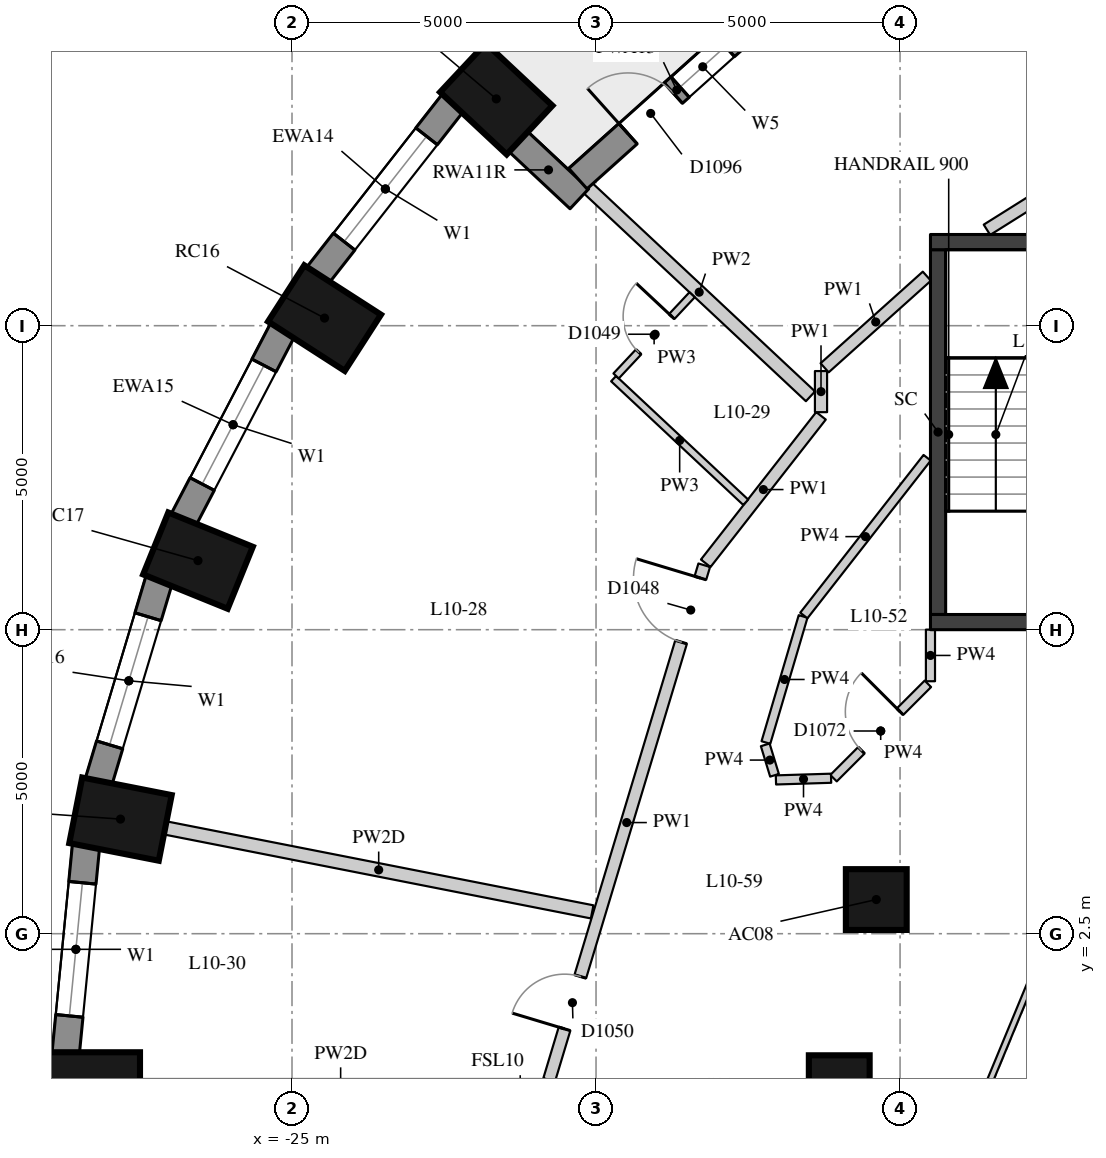
"""IFC4 building model, lengths in metres.
Left out: names, types, materials, properties, quantities, classifications, styles, units other than length and angle.
Written with IfcOpenShell. Run it as: python <this file> out.ifc"""

import sys

from ifc_helpers import new_model, si_unit, direction, frame, frame_2d, origin, origin_2d, place, context, subcontext, project, spatial, rectangle, extrude, element, fill, save


model = new_model("IFC4")
c1 = context("Model", 3, precision=1e-05, world=origin(), true_north=direction((0.0, 1.0)))
c2 = subcontext(c1, "Body", "Model", "MODEL_VIEW")
j1 = project(units=[si_unit("LENGTHUNIT", "METRE"), si_unit("PLANEANGLEUNIT", "RADIAN")], contexts=[c1])
p1 = place(None, origin())
s1 = spatial("IfcSite", under=j1, at=p1, CompositionType="ELEMENT")
p2 = place(p1, origin())
s2 = spatial("IfcBuilding", under=s1, at=p2, CompositionType="ELEMENT")
p3 = place(p2, frame((0.0, 0.0, 41.5)))
s3 = spatial("IfcBuildingStorey", under=s2, at=p3, CompositionType="ELEMENT", Elevation=41.5)
for number, where, z_axis, x_axis in (
    (1, (-21.641, 16.23, 0.0), (0.0, 0.0, 1.0), (-0.73, 0.683, 0.0)),
    (2, (-24.465, 12.625, 0.0), (0.0, 0.0, 1.0), (-0.841, 0.541, 0.0)),
    (3, (-26.546, 8.636, 0.0), (0.0, 0.0, 1.0), (-0.927, 0.376, 0.0)),
    (4, (-27.821, 4.385, 0.0), (0.0, 0.0, 1.0), (-0.981, 0.193, 0.0)),
    (5, (-28.25, 0.0, 0.0), (0.0, 0.0, 1.0), (-1.0, 0.0, 0.0)),
):
    element("IfcColumn", number, at=place(p3, frame(where, z_axis=z_axis, x_axis=x_axis)), inside=s3, PredefinedType="COLUMN", context=c2, shape_type="SweptSolid", body=[
        extrude(rectangle(XDim=1.5, YDim=1.1, at=origin_2d()), origin(), (0.0, 0.0, 1.0), 3.3),
    ])
for number, where, z_axis, x_axis in (
    (6, (-15.391, 3.062, 0.0), (0.0, 0.0, 1.0), (1.0, 0.0, 0.0)),
    (7, (-16.0, 0.0, 0.0), (0.0, 0.0, 1.0), (1.0, 0.0, 0.0)),
):
    element("IfcColumn", number, at=place(p3, frame(where, z_axis=z_axis, x_axis=x_axis)), inside=s3, PredefinedType="COLUMN", context=c2, shape_type="SweptSolid", body=[
        extrude(rectangle(XDim=1.0, YDim=1.0, at=origin_2d()), origin(), (0.0, 0.0, 1.0), 3.3),
    ])
p4 = place(p3, frame((-22.352, 16.17, 0.0), z_axis=(0.0, 0.0, 1.0), x_axis=(-0.616661975264, -0.787228053529, 0.0)))
e8 = element("IfcWall", 8, at=p4, inside=s3, PredefinedType="SOLIDWALL", context=c2, shape_type="SweptSolid", body=[
    extrude(rectangle(XDim=3.61, YDim=0.45, at=frame_2d((1.805, 0.0))), origin(), (0.0, 0.0, 1.0), 3.02),
])
p5 = place(p4, frame((0.705, 0.0, 0.4)))
e9 = element("IfcOpeningElement", 9, at=p5, cuts=e8, PredefinedType="OPENING", context=c2, shape_type="SweptSolid", body=[
    extrude(rectangle(XDim=2.2, YDim=1.75, at=frame_2d((1.1, 0.875))), frame((0.0, 0.235, 0.0), z_axis=(0.0, -1.0, 0.0), x_axis=(1.0, 0.0, 0.0)), (0.0, 0.0, 1.0), 0.47),
])
p6 = place(p3, frame((-25.152, 12.437, 0.0), z_axis=(0.0, 0.0, 1.0), x_axis=(-0.462492775226, -0.886623050041, 0.0)))
e10 = element("IfcWall", 10, at=p6, inside=s3, PredefinedType="SOLIDWALL", context=c2, shape_type="SweptSolid", body=[
    extrude(rectangle(XDim=3.532, YDim=0.45, at=frame_2d((1.766, 0.0))), origin(), (0.0, 0.0, 1.0), 3.02),
])
p7 = place(p6, frame((0.666, 0.0, 0.4)))
e11 = element("IfcOpeningElement", 11, at=p7, cuts=e10, PredefinedType="OPENING", context=c2, shape_type="SweptSolid", body=[
    extrude(rectangle(XDim=2.2, YDim=1.75, at=frame_2d((1.1, 0.875))), frame((0.0, 0.235, 0.0), z_axis=(0.0, -1.0, 0.0), x_axis=(1.0, 0.0, 0.0)), (0.0, 0.0, 1.0), 0.47),
])
p8 = place(p3, frame((-27.185, 8.323, 0.0), z_axis=(0.0, 0.0, 1.0), x_axis=(-0.287064133733, -0.957911364963, 0.0)))
e12 = element("IfcWall", 12, at=p8, inside=s3, PredefinedType="SOLIDWALL", context=c2, shape_type="SweptSolid", body=[
    extrude(rectangle(XDim=3.473, YDim=0.45, at=frame_2d((1.737, 0.0))), origin(), (0.0, 0.0, 1.0), 3.02),
])
p9 = place(p8, frame((0.637, 0.0, 0.4)))
e13 = element("IfcOpeningElement", 13, at=p9, cuts=e12, PredefinedType="OPENING", context=c2, shape_type="SweptSolid", body=[
    extrude(rectangle(XDim=2.2, YDim=1.75, at=frame_2d((1.1, 0.875))), frame((0.0, 0.235, 0.0), z_axis=(0.0, -1.0, 0.0), x_axis=(1.0, 0.0, 0.0)), (0.0, 0.0, 1.0), 0.47),
])
p10 = place(p3, frame((-28.387, 3.956, 0.0), z_axis=(0.0, 0.0, 1.0), x_axis=(-0.097389581596, -0.995246336038, 0.0)))
e14 = element("IfcWall", 14, at=p10, inside=s3, PredefinedType="SOLIDWALL", context=c2, shape_type="SweptSolid", body=[
    extrude(rectangle(XDim=3.442, YDim=0.45, at=frame_2d((1.721, 0.0))), origin(), (0.0, 0.0, 1.0), 3.02),
])
p11 = place(p10, frame((0.621, 0.0, 0.4)))
e15 = element("IfcOpeningElement", 15, at=p11, cuts=e14, PredefinedType="OPENING", context=c2, shape_type="SweptSolid", body=[
    extrude(rectangle(XDim=2.2, YDim=1.75, at=frame_2d((1.1, 0.875))), frame((0.0, 0.235, 0.0), z_axis=(0.0, -1.0, 0.0), x_axis=(1.0, 0.0, 0.0)), (0.0, 0.0, 1.0), 0.47),
])
p12 = place(p3, frame((-21.289, 15.538, 0.0), z_axis=(0.0, 0.0, 1.0), x_axis=(0.730149942784, -0.683286953668, 0.0)))
e16 = element("IfcWall", 16, at=p12, inside=s3, PredefinedType="SOLIDWALL", context=c2, shape_type="SweptSolid", body=[
    extrude(rectangle(XDim=1.391, YDim=0.45, at=frame_2d((0.695, 0.0))), origin(), (0.0, 0.0, 1.0), 3.02),
])
p13 = place(p3, frame((-17.048, 17.832, 0.0), z_axis=(0.0, 0.0, 1.0), x_axis=(-0.744619286768, -0.667489413978, 0.0)))
e17 = element("IfcWall", 17, at=p13, inside=s3, PredefinedType="SOLIDWALL", context=c2, shape_type="SweptSolid", body=[
    extrude(rectangle(XDim=4.365, YDim=0.45, at=frame_2d((2.183, 0.0))), origin(), (0.0, 0.0, 1.0), 3.02),
])
p14 = place(p13, frame((1.107, 0.0, 0.4)))
e18 = element("IfcOpeningElement", 18, at=p14, cuts=e17, PredefinedType="OPENING", context=c2, shape_type="SweptSolid", body=[
    extrude(rectangle(XDim=1.0, YDim=1.75, at=frame_2d((0.5, 0.875))), frame((0.0, 0.235, 0.0), z_axis=(0.0, -1.0, 0.0), x_axis=(1.0, 0.0, 0.0)), (0.0, 0.0, 1.0), 0.47),
])
p15 = place(p13, frame((2.258, 0.0, 0.0)))
e19 = element("IfcOpeningElement", 19, at=p15, cuts=e17, PredefinedType="OPENING", context=c2, shape_type="SweptSolid", body=[
    extrude(rectangle(XDim=1.0, YDim=2.15, at=frame_2d((0.5, 1.075))), frame((0.0, 0.235, 0.0), z_axis=(0.0, -1.0, 0.0), x_axis=(1.0, 0.0, 0.0)), (0.0, 0.0, 1.0), 0.47),
])
p16 = place(p3, frame((-14.375, 7.75, -0.28), z_axis=(0.0, 0.0, 1.0), x_axis=(0.0, 1.0, 0.0)))
e20 = element("IfcWall", 20, at=p16, inside=s3, PredefinedType="SHEAR", context=c2, shape_type="SweptSolid", body=[
    extrude(rectangle(XDim=6.0, YDim=0.25, at=frame_2d((3.0, 0.0))), origin(), (0.0, 0.0, 1.0), 3.3),
])
for number, where, z_axis, x_axis in (
    (21, (-14.5, 13.875, -0.28), (0.0, 0.0, 1.0), (1.0, 0.0, 0.0)),
    (22, (-14.5, 7.625, -0.28), (0.0, 0.0, 1.0), (1.0, 0.0, 0.0)),
):
    element("IfcWall", number, at=place(p3, frame(where, z_axis=z_axis, x_axis=x_axis)), inside=s3, PredefinedType="SHEAR", context=c2, shape_type="SweptSolid", body=[
        extrude(rectangle(XDim=5.2, YDim=0.25, at=frame_2d((2.6, 0.0))), origin(), (0.0, 0.0, 1.0), 3.3),
    ])
p17 = place(p3, frame((-20.771, 0.095, 0.0), z_axis=(0.0, 0.0, 1.0), x_axis=(0.288464952331, 0.957490454927, 0.0)))
e23 = element("IfcWall", 23, at=p17, inside=s3, PredefinedType="PARTITIONING", context=c2, shape_type="SweptSolid", body=[
    extrude(rectangle(XDim=8.841, YDim=0.2, at=frame_2d((4.42, 0.0))), origin(), (0.0, 0.0, 1.0), 3.02),
])
p18 = place(p17, frame((7.521, 0.0, 0.0)))
e24 = element("IfcOpeningElement", 24, at=p18, cuts=e23, PredefinedType="OPENING", context=c2, shape_type="SweptSolid", body=[
    extrude(rectangle(XDim=1.1, YDim=2.1, at=frame_2d((0.55, 1.05))), frame((0.0, 0.11, 0.0), z_axis=(0.0, -1.0, 0.0), x_axis=(1.0, 0.0, 0.0)), (0.0, 0.0, 1.0), 0.22),
])
p19 = place(p17, frame((0.877, 0.0, 0.0)))
e25 = element("IfcOpeningElement", 25, at=p19, cuts=e23, PredefinedType="OPENING", context=c2, shape_type="SweptSolid", body=[
    extrude(rectangle(XDim=0.9, YDim=2.1, at=frame_2d((0.45, 1.05))), frame((0.0, 0.11, 0.0), z_axis=(0.0, -1.0, 0.0), x_axis=(1.0, 0.0, 0.0)), (0.0, 0.0, 1.0), 0.22),
])
p20 = place(p3, frame((-18.196, 8.592, 0.0), z_axis=(0.0, 0.0, 1.0), x_axis=(0.615854849191, 0.787859635168, 0.0)))
e26 = element("IfcWall", 26, at=p20, inside=s3, PredefinedType="PARTITIONING", context=c2, shape_type="SweptSolid", body=[
    extrude(rectangle(XDim=3.079, YDim=0.2, at=frame_2d((1.539, 0.0))), origin(), (0.0, 0.0, 1.0), 3.02),
])
p21 = place(p3, frame((-16.3, 11.078, 0.0), z_axis=(0.0, 0.0, 1.0), x_axis=(0.0, 1.0, 0.0)))
e27 = element("IfcWall", 27, at=p21, inside=s3, PredefinedType="PARTITIONING", context=c2, shape_type="SweptSolid", body=[
    extrude(rectangle(XDim=0.676, YDim=0.2, at=frame_2d((0.338, 0.0))), origin(), (0.0, 0.0, 1.0), 3.02),
])
p22 = place(p3, frame((-16.24, 11.807, 0.0), z_axis=(0.0, 0.0, 1.0), x_axis=(0.744658399013, 0.667445779655, 0.0)))
e28 = element("IfcWall", 28, at=p22, inside=s3, PredefinedType="PARTITIONING", context=c2, shape_type="SweptSolid", body=[
    extrude(rectangle(XDim=2.258, YDim=0.2, at=frame_2d((1.129, 0.0))), origin(), (0.0, 0.0, 1.0), 3.02),
])
p23 = place(p3, frame((-13.571, 14.077, 0.0), z_axis=(0.0, 0.0, 1.0), x_axis=(0.846954991261, 0.53166459613, 0.0)))
e29 = element("IfcWall", 29, at=p23, inside=s3, PredefinedType="PARTITIONING", context=c2, shape_type="SweptSolid", body=[
    extrude(rectangle(XDim=3.068, YDim=0.2, at=frame_2d((1.534, 0.0))), origin(), (0.0, 0.0, 1.0), 3.02),
])
p24 = place(p3, frame((-14.5, 7.501, 0.0), z_axis=(0.0, 0.0, 1.0), x_axis=(0.0, -1.0, 0.0)))
e30 = element("IfcWall", 30, at=p24, inside=s3, PredefinedType="PARTITIONING", context=c2, shape_type="SweptSolid", body=[
    extrude(rectangle(XDim=0.849, YDim=0.15, at=frame_2d((0.424, 0.0))), origin(), (0.0, 0.0, 1.0), 3.02),
])
p25 = place(p3, frame((-14.542, 6.61, 0.0), z_axis=(0.0, 0.0, 1.0), x_axis=(-0.707106781187, -0.707106781187, 0.0)))
e31 = element("IfcWall", 31, at=p25, inside=s3, PredefinedType="PARTITIONING", context=c2, shape_type="SweptSolid", body=[
    extrude(rectangle(XDim=2.195, YDim=0.15, at=frame_2d((1.097, 0.0))), origin(), (0.0, 0.0, 1.0), 3.02),
])
p26 = place(p25, frame((0.647, 0.0, 0.0)))
e32 = element("IfcOpeningElement", 32, at=p26, cuts=e31, PredefinedType="OPENING", context=c2, shape_type="SweptSolid", body=[
    extrude(rectangle(XDim=0.9, YDim=2.1, at=frame_2d((0.45, 1.05))), frame((0.0, 0.085, 0.0), z_axis=(0.0, -1.0, 0.0), x_axis=(1.0, 0.0, 0.0)), (0.0, 0.0, 1.0), 0.17),
])
p27 = place(p3, frame((-16.134, 5.057, 0.0), z_axis=(0.0, 0.0, 1.0), x_axis=(-0.999529504487, -0.030671968644, 0.0)))
e33 = element("IfcWall", 33, at=p27, inside=s3, PredefinedType="PARTITIONING", context=c2, shape_type="SweptSolid", body=[
    extrude(rectangle(XDim=0.907, YDim=0.15, at=frame_2d((0.454, 0.0))), origin(), (0.0, 0.0, 1.0), 3.02),
])
p28 = place(p3, frame((-17.065, 5.105, 0.0), z_axis=(0.0, 0.0, 1.0), x_axis=(-0.291495658108, 0.956572151646, 0.0)))
e34 = element("IfcWall", 34, at=p28, inside=s3, PredefinedType="PARTITIONING", context=c2, shape_type="SweptSolid", body=[
    extrude(rectangle(XDim=0.523, YDim=0.15, at=frame_2d((0.262, 0.0))), origin(), (0.0, 0.0, 1.0), 3.02),
])
p29 = place(p3, frame((-17.206, 5.645, 0.0), z_axis=(0.0, 0.0, 1.0), x_axis=(0.282930600638, 0.95914038348, 0.0)))
e35 = element("IfcWall", 35, at=p29, inside=s3, PredefinedType="PARTITIONING", context=c2, shape_type="SweptSolid", body=[
    extrude(rectangle(XDim=2.162, YDim=0.15, at=frame_2d((1.081, 0.0))), origin(), (0.0, 0.0, 1.0), 3.02),
])
p30 = place(p3, frame((-16.582, 7.734, 0.0), z_axis=(0.0, 0.0, 1.0), x_axis=(0.615848335932, 0.787864726416, 0.0)))
e36 = element("IfcWall", 36, at=p30, inside=s3, PredefinedType="PARTITIONING", context=c2, shape_type="SweptSolid", body=[
    extrude(rectangle(XDim=3.293, YDim=0.15, at=frame_2d((1.646, 0.0))), origin(), (0.0, 0.0, 1.0), 3.02),
])
p31 = place(p3, frame((-20.133, 14.764, 0.0), z_axis=(0.0, 0.0, 1.0), x_axis=(0.73007309337, -0.683369064516, 0.0)))
e37 = element("IfcWall", 37, at=p31, inside=s3, PredefinedType="PARTITIONING", context=c2, shape_type="SweptSolid", body=[
    extrude(rectangle(XDim=5.013, YDim=0.22, at=frame_2d((2.507, 0.0))), origin(), (0.0, 0.0, 1.0), 3.02),
])
p32 = place(p3, frame((-27.085, 4.24, 0.0), z_axis=(0.0, 0.0, 1.0), x_axis=(0.981197740145, -0.193005167635, 0.0)))
e38 = element("IfcWall", 38, at=p32, inside=s3, PredefinedType="PARTITIONING", context=c2, shape_type="SweptSolid", body=[
    extrude(rectangle(XDim=7.156, YDim=0.22, at=frame_2d((3.578, 0.0))), origin(), (0.0, 0.0, 1.0), 2.47),
])
p33 = place(p3, frame((-17.538, 9.596, 0.0), z_axis=(0.0, 0.0, 1.0), x_axis=(-0.730099766179, 0.683340567671, 0.0)))
e39 = element("IfcWall", 39, at=p33, inside=s3, PredefinedType="PARTITIONING", context=c2, shape_type="SweptSolid", body=[
    extrude(rectangle(XDim=2.976, YDim=0.12, at=frame_2d((1.488, 0.0))), origin(), (0.0, 0.0, 1.0), 3.02),
])
p34 = place(p3, frame((-19.67, 11.673, 0.0), z_axis=(0.0, 0.0, 1.0), x_axis=(0.683372850006, 0.730069550026, 0.0)))
e40 = element("IfcWall", 40, at=p34, inside=s3, PredefinedType="PARTITIONING", context=c2, shape_type="SweptSolid", body=[
    extrude(rectangle(XDim=1.83, YDim=0.12, at=frame_2d((0.915, 0.0))), origin(), (0.0, 0.0, 1.0), 3.02),
])
p35 = place(p34, frame((0.54, 0.0, 0.0)))
e41 = element("IfcOpeningElement", 41, at=p35, cuts=e40, PredefinedType="OPENING", context=c2, shape_type="SweptSolid", body=[
    extrude(rectangle(XDim=0.8, YDim=2.1, at=frame_2d((0.4, 1.05))), frame((0.0, 0.07, 0.0), z_axis=(0.0, -1.0, 0.0), x_axis=(1.0, 0.0, 0.0)), (0.0, 0.0, 1.0), 0.14),
])
p36 = place(p3, frame((-13.554, 0.0, 0.0), z_axis=(0.0, 0.0, 1.0), x_axis=(0.382730523909, 0.923860025149, 0.0)))
e42 = element("IfcWall", 42, at=p36, inside=s3, PredefinedType="PARTITIONING", context=c2, shape_type="SweptSolid", body=[
    extrude(rectangle(XDim=4.251, YDim=0.1, at=frame_2d((2.125, 0.0))), origin(), (0.0, 0.0, 1.0), 3.02),
])
p37 = place(p5, origin())
e43 = element("IfcWindow", 43, at=p37, inside=s3, PartitioningType="SINGLE_PANEL", PredefinedType="WINDOW", context=c2, shape_type="SweptSolid", body=[
    extrude(rectangle(XDim=2.2, YDim=1.75, at=frame_2d((1.1, 0.875))), frame((0.0, 0.035, 0.0), z_axis=(0.0, -1.0, 0.0), x_axis=(1.0, 0.0, 0.0)), (0.0, 0.0, 1.0), 0.06),
])
fill(e9, e43)
p38 = place(p7, origin())
e44 = element("IfcWindow", 44, at=p38, inside=s3, PartitioningType="SINGLE_PANEL", PredefinedType="WINDOW", context=c2, shape_type="SweptSolid", body=[
    extrude(rectangle(XDim=2.2, YDim=1.75, at=frame_2d((1.1, 0.875))), frame((0.0, 0.035, 0.0), z_axis=(0.0, -1.0, 0.0), x_axis=(1.0, 0.0, 0.0)), (0.0, 0.0, 1.0), 0.06),
])
fill(e11, e44)
p39 = place(p9, origin())
e45 = element("IfcWindow", 45, at=p39, inside=s3, PartitioningType="SINGLE_PANEL", PredefinedType="WINDOW", context=c2, shape_type="SweptSolid", body=[
    extrude(rectangle(XDim=2.2, YDim=1.75, at=frame_2d((1.1, 0.875))), frame((0.0, 0.035, 0.0), z_axis=(0.0, -1.0, 0.0), x_axis=(1.0, 0.0, 0.0)), (0.0, 0.0, 1.0), 0.06),
])
fill(e13, e45)
p40 = place(p11, origin())
e46 = element("IfcWindow", 46, at=p40, inside=s3, PartitioningType="SINGLE_PANEL", PredefinedType="WINDOW", context=c2, shape_type="SweptSolid", body=[
    extrude(rectangle(XDim=2.2, YDim=1.75, at=frame_2d((1.1, 0.875))), frame((0.0, 0.035, 0.0), z_axis=(0.0, -1.0, 0.0), x_axis=(1.0, 0.0, 0.0)), (0.0, 0.0, 1.0), 0.06),
])
fill(e15, e46)
p41 = place(p14, origin())
e47 = element("IfcWindow", 47, at=p41, inside=s3, PartitioningType="SINGLE_PANEL", PredefinedType="WINDOW", context=c2, shape_type="SweptSolid", body=[
    extrude(rectangle(XDim=1.0, YDim=1.75, at=frame_2d((0.5, 0.875))), frame((0.0, 0.035, 0.0), z_axis=(0.0, -1.0, 0.0), x_axis=(1.0, 0.0, 0.0)), (0.0, 0.0, 1.0), 0.06),
])
fill(e18, e47)
p42 = place(p15, frame((1.0, 0.0, 0.0), z_axis=(0.0, 0.0, 1.0), x_axis=(-1.0, 0.0, 0.0)))
e48 = element("IfcDoor", 48, at=p42, inside=s3, OperationType="SINGLE_SWING_LEFT", PredefinedType="DOOR", context=c2, shape_type="SweptSolid", body=[
    extrude(rectangle(XDim=1.0, YDim=2.15, at=frame_2d((0.5, 1.075))), frame((0.0, 0.075, 0.0), z_axis=(0.0, -1.0, 0.0), x_axis=(1.0, 0.0, 0.0)), (0.0, 0.0, 1.0), 0.05),
])
fill(e19, e48)
p43 = place(p18, origin())
e49 = element("IfcDoor", 49, at=p43, inside=s3, OperationType="SINGLE_SWING_RIGHT", PredefinedType="DOOR", context=c2, shape_type="SweptSolid", body=[
    extrude(rectangle(XDim=1.1, YDim=2.1, at=frame_2d((0.55, 1.05))), frame((0.0, 0.025, 0.0), z_axis=(0.0, -1.0, 0.0), x_axis=(1.0, 0.0, 0.0)), (0.0, 0.0, 1.0), 0.05),
])
fill(e24, e49)
p44 = place(p35, origin())
e50 = element("IfcDoor", 50, at=p44, inside=s3, OperationType="SINGLE_SWING_RIGHT", PredefinedType="DOOR", context=c2, shape_type="SweptSolid", body=[
    extrude(rectangle(XDim=0.8, YDim=2.1, at=frame_2d((0.4, 1.05))), frame((0.0, 0.025, 0.0), z_axis=(0.0, -1.0, 0.0), x_axis=(1.0, 0.0, 0.0)), (0.0, 0.0, 1.0), 0.05),
])
fill(e41, e50)
p45 = place(p19, origin())
e51 = element("IfcDoor", 51, at=p45, inside=s3, OperationType="SINGLE_SWING_LEFT", PredefinedType="DOOR", context=c2, shape_type="SweptSolid", body=[
    extrude(rectangle(XDim=0.9, YDim=2.1, at=frame_2d((0.45, 1.05))), frame((0.0, 0.025, 0.0), z_axis=(0.0, -1.0, 0.0), x_axis=(1.0, 0.0, 0.0)), (0.0, 0.0, 1.0), 0.05),
])
fill(e25, e51)
p46 = place(p26, origin())
e52 = element("IfcDoor", 52, at=p46, inside=s3, OperationType="SINGLE_SWING_RIGHT", PredefinedType="DOOR", context=c2, shape_type="SweptSolid", body=[
    extrude(rectangle(XDim=0.9, YDim=2.1, at=frame_2d((0.45, 1.05))), frame((0.0, 0.025, 0.0), z_axis=(0.0, -1.0, 0.0), x_axis=(1.0, 0.0, 0.0)), (0.0, 0.0, 1.0), 0.05),
])
fill(e32, e52)
save(model, sys.argv[1])
